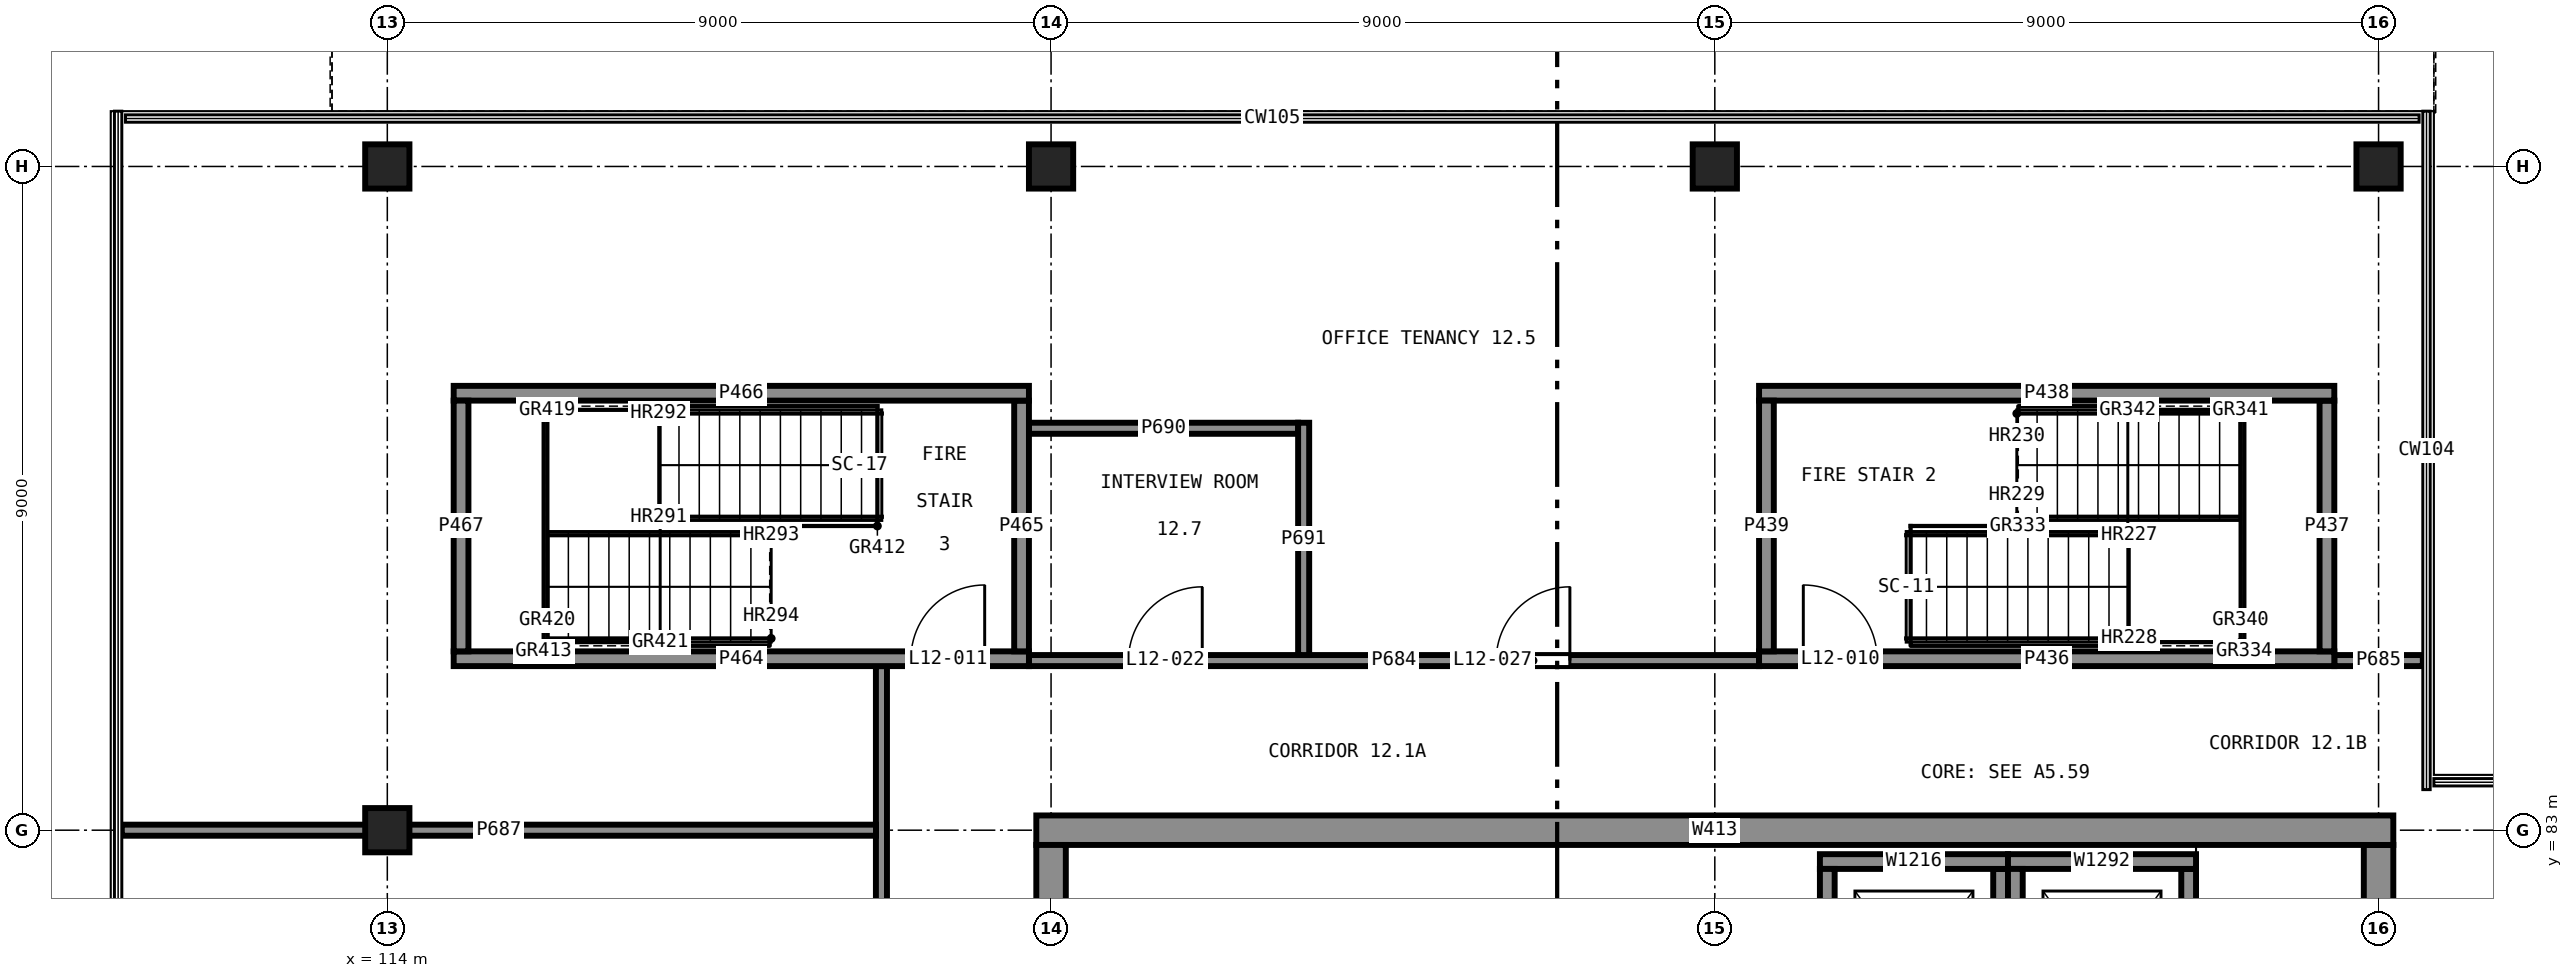
"""IFC4 building model, lengths in metres.
Left out: names, types, materials, properties, quantities, classifications, styles, units other than length and angle.
Written with IfcOpenShell. Run it as: python <this file> out.ifc"""

import sys

from ifc_helpers import new_model, si_unit, direction, frame, frame_2d, origin, origin_2d, place, context, subcontext, project, spatial, rectangle, extrude, element, fill, save


model = new_model("IFC4")
c1 = context("Model", 3, precision=1e-05, world=origin(), true_north=direction((0.0, 1.0)))
c2 = subcontext(c1, "Body", "Model", "MODEL_VIEW")
j1 = project(units=[si_unit("LENGTHUNIT", "METRE"), si_unit("PLANEANGLEUNIT", "RADIAN")], contexts=[c1])
p1 = place(None, origin())
s1 = spatial("IfcSite", under=j1, at=p1, CompositionType="ELEMENT")
p2 = place(p1, origin())
s2 = spatial("IfcBuilding", under=s1, at=p2, CompositionType="ELEMENT")
p3 = place(p2, frame((0.0, 0.0, 49.5)))
s3 = spatial("IfcBuildingStorey", under=s2, at=p3, CompositionType="ELEMENT", Elevation=49.5)
for number, where, z_axis, x_axis in (
    (1, (114.0, 83.0, 0.0), (0.0, 0.0, 1.0), (1.0, 0.0, 0.0)),
    (2, (114.0, 92.0, 0.0), (0.0, 0.0, 1.0), (1.0, 0.0, 0.0)),
    (3, (123.0, 92.0, 0.0), (0.0, 0.0, 1.0), (1.0, 0.0, 0.0)),
    (4, (132.0, 92.0, 0.0), (0.0, 0.0, 1.0), (1.0, 0.0, 0.0)),
    (5, (141.0, 92.0, 0.0), (0.0, 0.0, 1.0), (1.0, 0.0, 0.0)),
):
    element("IfcColumn", number, at=place(p3, frame(where, z_axis=z_axis, x_axis=x_axis)), inside=s3, PredefinedType="COLUMN", context=c2, shape_type="SweptSolid", body=[
        extrude(rectangle(XDim=0.6, YDim=0.6, at=origin_2d()), origin(), (0.0, 0.0, 1.0), 4.0),
    ])
p4 = place(p3, frame((141.0, 65.2, 0.0), z_axis=(0.0, 0.0, 1.0), x_axis=(0.0, 1.0, 0.0)))
e6 = element("IfcWall", 6, at=p4, inside=s3, PredefinedType="SHEAR", context=c2, shape_type="SweptSolid", body=[
    extrude(rectangle(XDim=17.6, YDim=0.4, at=frame_2d((8.8, 0.0))), origin(), (0.0, 0.0, 1.0), 4.0),
])
p5 = place(p4, frame((4.325, 0.0, 0.0)))
e7 = element("IfcOpeningElement", 7, at=p5, cuts=e6, PredefinedType="OPENING", context=c2, shape_type="SweptSolid", body=[
    extrude(rectangle(XDim=1.2, YDim=2.1, at=frame_2d((0.6, 1.05))), frame((0.0, 0.21, 0.0), z_axis=(0.0, -1.0, 0.0), x_axis=(1.0, 0.0, 0.0)), (0.0, 0.0, 1.0), 0.42),
])
p6 = place(p4, frame((12.075, 0.0, 0.0)))
e8 = element("IfcOpeningElement", 8, at=p6, cuts=e6, PredefinedType="OPENING", context=c2, shape_type="SweptSolid", body=[
    extrude(rectangle(XDim=1.2, YDim=2.1, at=frame_2d((0.6, 1.05))), frame((0.0, 0.21, 0.0), z_axis=(0.0, -1.0, 0.0), x_axis=(1.0, 0.0, 0.0)), (0.0, 0.0, 1.0), 0.42),
])
p7 = place(p3, frame((141.2, 83.0, 0.0), z_axis=(0.0, 0.0, 1.0), x_axis=(-1.0, 0.0, 0.0)))
e9 = element("IfcWall", 9, at=p7, inside=s3, PredefinedType="SHEAR", context=c2, shape_type="SweptSolid", body=[
    extrude(rectangle(XDim=18.4, YDim=0.4, at=frame_2d((9.2, 0.0))), origin(), (0.0, 0.0, 1.0), 4.0),
])
p8 = place(p3, frame((123.0, 82.8, 0.0), z_axis=(0.0, 0.0, 1.0), x_axis=(0.0, -1.0, 0.0)))
e10 = element("IfcWall", 10, at=p8, inside=s3, PredefinedType="SHEAR", context=c2, shape_type="SweptSolid", body=[
    extrude(rectangle(XDim=17.6, YDim=0.4, at=frame_2d((8.8, 0.0))), origin(), (0.0, 0.0, 1.0), 4.0),
])
p9 = place(p8, frame((12.075, 0.0, 0.0)))
e11 = element("IfcOpeningElement", 11, at=p9, cuts=e10, PredefinedType="OPENING", context=c2, shape_type="SweptSolid", body=[
    extrude(rectangle(XDim=1.2, YDim=2.1, at=frame_2d((0.6, 1.05))), frame((0.0, 0.21, 0.0), z_axis=(0.0, -1.0, 0.0), x_axis=(1.0, 0.0, 0.0)), (0.0, 0.0, 1.0), 0.42),
])
p10 = place(p8, frame((4.325, 0.0, 0.0)))
e12 = element("IfcOpeningElement", 12, at=p10, cuts=e10, PredefinedType="OPENING", context=c2, shape_type="SweptSolid", body=[
    extrude(rectangle(XDim=1.2, YDim=2.1, at=frame_2d((0.6, 1.05))), frame((0.0, 0.21, 0.0), z_axis=(0.0, -1.0, 0.0), x_axis=(1.0, 0.0, 0.0)), (0.0, 0.0, 1.0), 0.42),
])
p11 = place(p3, frame((135.875, 79.675, 0.0), z_axis=(0.0, 0.0, 1.0), x_axis=(0.0, 1.0, 0.0)))
e13 = element("IfcWall", 13, at=p11, inside=s3, PredefinedType="SHEAR", context=c2, shape_type="SweptSolid", body=[
    extrude(rectangle(XDim=2.8, YDim=0.2, at=frame_2d((1.4, 0.0))), origin(), (0.0, 0.0, 1.0), 4.0),
])
p12 = place(p3, frame((135.975, 82.575, 0.0), z_axis=(0.0, 0.0, 1.0), x_axis=(-1.0, 0.0, 0.0)))
e14 = element("IfcWall", 14, at=p12, inside=s3, PredefinedType="SHEAR", context=c2, shape_type="SweptSolid", body=[
    extrude(rectangle(XDim=2.55, YDim=0.2, at=frame_2d((1.275, 0.0))), origin(), (0.0, 0.0, 1.0), 4.0),
])
for number, where, z_axis, x_axis in (
    (15, (133.525, 82.475, 0.0), (0.0, 0.0, 1.0), (0.0, -1.0, 0.0)),
    (16, (138.425, 79.675, 0.0), (0.0, 0.0, 1.0), (0.0, 1.0, 0.0)),
):
    element("IfcWall", number, at=place(p3, frame(where, z_axis=z_axis, x_axis=x_axis)), inside=s3, PredefinedType="SHEAR", context=c2, shape_type="SweptSolid", body=[
        extrude(rectangle(XDim=2.8, YDim=0.2, at=frame_2d((1.4, 0.0))), origin(), (0.0, 0.0, 1.0), 4.0),
    ])
p13 = place(p3, frame((138.525, 82.575, 0.0), z_axis=(0.0, 0.0, 1.0), x_axis=(-1.0, 0.0, 0.0)))
e17 = element("IfcWall", 17, at=p13, inside=s3, PredefinedType="SHEAR", context=c2, shape_type="SweptSolid", body=[
    extrude(rectangle(XDim=2.55, YDim=0.2, at=frame_2d((1.275, 0.0))), origin(), (0.0, 0.0, 1.0), 4.0),
])
p14 = place(p3, frame((136.075, 82.475, 0.0), z_axis=(0.0, 0.0, 1.0), x_axis=(0.0, -1.0, 0.0)))
e18 = element("IfcWall", 18, at=p14, inside=s3, PredefinedType="SHEAR", context=c2, shape_type="SweptSolid", body=[
    extrude(rectangle(XDim=2.8, YDim=0.2, at=frame_2d((1.4, 0.0))), origin(), (0.0, 0.0, 1.0), 4.0),
])
p15 = place(p3, frame((132.6, 85.325, 0.0), z_axis=(0.0, 0.0, 1.0), x_axis=(1.0, 0.0, 0.0)))
e19 = element("IfcWall", 19, at=p15, inside=s3, PredefinedType="SHEAR", context=c2, shape_type="SweptSolid", body=[
    extrude(rectangle(XDim=7.8, YDim=0.2, at=frame_2d((3.9, 0.0))), origin(), (0.0, 0.0, 1.0), 3.58),
])
p16 = place(p15, frame((0.6, 0.0, 0.0)))
e20 = element("IfcOpeningElement", 20, at=p16, cuts=e19, PredefinedType="OPENING", context=c2, shape_type="SweptSolid", body=[
    extrude(rectangle(XDim=1.0, YDim=2.1, at=frame_2d((0.5, 1.05))), frame((0.0, 0.11, 0.0), z_axis=(0.0, -1.0, 0.0), x_axis=(1.0, 0.0, 0.0)), (0.0, 0.0, 1.0), 0.22),
])
p17 = place(p3, frame((140.3, 85.425, 0.0), z_axis=(0.0, 0.0, 1.0), x_axis=(0.0, 1.0, 0.0)))
e21 = element("IfcWall", 21, at=p17, inside=s3, PredefinedType="SHEAR", context=c2, shape_type="SweptSolid", body=[
    extrude(rectangle(XDim=3.4, YDim=0.2, at=frame_2d((1.7, 0.0))), origin(), (0.0, 0.0, 1.0), 3.58),
])
p18 = place(p3, frame((140.4, 88.925, 0.0), z_axis=(0.0, 0.0, 1.0), x_axis=(-1.0, 0.0, 0.0)))
e22 = element("IfcWall", 22, at=p18, inside=s3, PredefinedType="SHEAR", context=c2, shape_type="SweptSolid", body=[
    extrude(rectangle(XDim=7.8, YDim=0.2, at=frame_2d((3.9, 0.0))), origin(), (0.0, 0.0, 1.0), 3.58),
])
p19 = place(p3, frame((132.7, 88.825, 0.0), z_axis=(0.0, 0.0, 1.0), x_axis=(0.0, -1.0, 0.0)))
e23 = element("IfcWall", 23, at=p19, inside=s3, PredefinedType="SHEAR", context=c2, shape_type="SweptSolid", body=[
    extrude(rectangle(XDim=3.4, YDim=0.2, at=frame_2d((1.7, 0.0))), origin(), (0.0, 0.0, 1.0), 3.58),
])
p20 = place(p3, frame((114.9, 85.325, 0.0), z_axis=(0.0, 0.0, 1.0), x_axis=(1.0, 0.0, 0.0)))
e24 = element("IfcWall", 24, at=p20, inside=s3, PredefinedType="SHEAR", context=c2, shape_type="SweptSolid", body=[
    extrude(rectangle(XDim=7.8, YDim=0.2, at=frame_2d((3.9, 0.0))), origin(), (0.0, 0.0, 1.0), 3.58),
])
p21 = place(p20, frame((6.2, 0.0, 0.0)))
e25 = element("IfcOpeningElement", 25, at=p21, cuts=e24, PredefinedType="OPENING", context=c2, shape_type="SweptSolid", body=[
    extrude(rectangle(XDim=1.0, YDim=2.1, at=frame_2d((0.5, 1.05))), frame((0.0, 0.11, 0.0), z_axis=(0.0, -1.0, 0.0), x_axis=(1.0, 0.0, 0.0)), (0.0, 0.0, 1.0), 0.22),
])
p22 = place(p3, frame((122.6, 85.425, 0.0), z_axis=(0.0, 0.0, 1.0), x_axis=(0.0, 1.0, 0.0)))
e26 = element("IfcWall", 26, at=p22, inside=s3, PredefinedType="SHEAR", context=c2, shape_type="SweptSolid", body=[
    extrude(rectangle(XDim=3.4, YDim=0.2, at=frame_2d((1.7, 0.0))), origin(), (0.0, 0.0, 1.0), 3.58),
])
p23 = place(p3, frame((122.7, 88.925, 0.0), z_axis=(0.0, 0.0, 1.0), x_axis=(-1.0, 0.0, 0.0)))
e27 = element("IfcWall", 27, at=p23, inside=s3, PredefinedType="SHEAR", context=c2, shape_type="SweptSolid", body=[
    extrude(rectangle(XDim=7.8, YDim=0.2, at=frame_2d((3.9, 0.0))), origin(), (0.0, 0.0, 1.0), 3.58),
])
p24 = place(p3, frame((115.0, 88.825, 0.0), z_axis=(0.0, 0.0, 1.0), x_axis=(0.0, -1.0, 0.0)))
e28 = element("IfcWall", 28, at=p24, inside=s3, PredefinedType="SHEAR", context=c2, shape_type="SweptSolid", body=[
    extrude(rectangle(XDim=3.4, YDim=0.2, at=frame_2d((1.7, 0.0))), origin(), (0.0, 0.0, 1.0), 3.58),
])
p25 = place(p3, frame((120.7, 64.4, 0.0), z_axis=(0.0, 0.0, 1.0), x_axis=(0.0, 1.0, 0.0)))
e29 = element("IfcWall", 29, at=p25, inside=s3, PredefinedType="PARTITIONING", context=c2, shape_type="SweptSolid", body=[
    extrude(rectangle(XDim=20.825, YDim=0.15, at=frame_2d((10.413, 0.0))), origin(), (0.0, 0.0, 1.0), 3.58),
])
p26 = place(p25, frame((4.413, 0.0, 0.0)))
e30 = element("IfcOpeningElement", 30, at=p26, cuts=e29, PredefinedType="OPENING", context=c2, shape_type="SweptSolid", body=[
    extrude(rectangle(XDim=1.0, YDim=2.1, at=frame_2d((0.5, 1.05))), frame((0.0, 0.085, 0.0), z_axis=(0.0, -1.0, 0.0), x_axis=(1.0, 0.0, 0.0)), (0.0, 0.0, 1.0), 0.17),
])
p27 = place(p25, frame((13.6, 0.0, 0.0)))
e31 = element("IfcOpeningElement", 31, at=p27, cuts=e29, PredefinedType="OPENING", context=c2, shape_type="SweptSolid", body=[
    extrude(rectangle(XDim=1.0, YDim=2.1, at=frame_2d((0.5, 1.05))), frame((0.0, 0.085, 0.0), z_axis=(0.0, -1.0, 0.0), x_axis=(1.0, 0.0, 0.0)), (0.0, 0.0, 1.0), 0.17),
])
p28 = place(p3, frame((122.7, 85.3, 0.0), z_axis=(0.0, 0.0, 1.0), x_axis=(1.0, 0.0, 0.0)))
e32 = element("IfcWall", 32, at=p28, inside=s3, PredefinedType="PARTITIONING", context=c2, shape_type="SweptSolid", body=[
    extrude(rectangle(XDim=9.9, YDim=0.15, at=frame_2d((4.95, 0.0))), origin(), (0.0, 0.0, 1.0), 3.58),
])
p29 = place(p28, frame((1.35, 0.0, 0.0)))
e33 = element("IfcOpeningElement", 33, at=p29, cuts=e32, PredefinedType="OPENING", context=c2, shape_type="SweptSolid", body=[
    extrude(rectangle(XDim=1.0, YDim=2.1, at=frame_2d((0.5, 1.05))), frame((0.0, 0.085, 0.0), z_axis=(0.0, -1.0, 0.0), x_axis=(1.0, 0.0, 0.0)), (0.0, 0.0, 1.0), 0.17),
])
p30 = place(p28, frame((6.335, 0.0, 0.0)))
e34 = element("IfcOpeningElement", 34, at=p30, cuts=e32, PredefinedType="OPENING", context=c2, shape_type="SweptSolid", body=[
    extrude(rectangle(XDim=1.0, YDim=2.1, at=frame_2d((0.5, 1.05))), frame((0.0, 0.085, 0.0), z_axis=(0.0, -1.0, 0.0), x_axis=(1.0, 0.0, 0.0)), (0.0, 0.0, 1.0), 0.17),
])
p31 = place(p3, frame((140.4, 85.3, 0.0), z_axis=(0.0, 0.0, 1.0), x_axis=(1.0, 0.0, 0.0)))
e35 = element("IfcWall", 35, at=p31, inside=s3, PredefinedType="PARTITIONING", context=c2, shape_type="SweptSolid", body=[
    extrude(rectangle(XDim=1.2, YDim=0.15, at=frame_2d((0.6, 0.0))), origin(), (0.0, 0.0, 1.0), 3.58),
])
p32 = place(p3, frame((110.4, 83.0, 0.0), z_axis=(0.0, 0.0, 1.0), x_axis=(1.0, 0.0, 0.0)))
e36 = element("IfcWall", 36, at=p32, inside=s3, PredefinedType="PARTITIONING", context=c2, shape_type="SweptSolid", body=[
    extrude(rectangle(XDim=10.226, YDim=0.15, at=frame_2d((5.113, 0.0))), origin(), (0.0, 0.0, 1.0), 2.68),
])
p33 = place(p3, frame((122.7, 88.45, 0.0), z_axis=(0.0, 0.0, 1.0), x_axis=(1.0, 0.0, 0.0)))
e37 = element("IfcWall", 37, at=p33, inside=s3, PredefinedType="PARTITIONING", context=c2, shape_type="SweptSolid", body=[
    extrude(rectangle(XDim=3.65, YDim=0.15, at=frame_2d((1.825, 0.0))), origin(), (0.0, 0.0, 1.0), 3.58),
])
p34 = place(p3, frame((126.425, 85.375, 0.0), z_axis=(0.0, 0.0, 1.0), x_axis=(0.0, 1.0, 0.0)))
e38 = element("IfcWall", 38, at=p34, inside=s3, PredefinedType="PARTITIONING", context=c2, shape_type="SweptSolid", body=[
    extrude(rectangle(XDim=3.15, YDim=0.15, at=frame_2d((1.575, 0.0))), origin(), (0.0, 0.0, 1.0), 3.58),
])
p35 = place(p16, origin())
e39 = element("IfcDoor", 39, at=p35, inside=s3, OperationType="SINGLE_SWING_RIGHT", PredefinedType="DOOR", context=c2, shape_type="SweptSolid", body=[
    extrude(rectangle(XDim=1.0, YDim=2.1, at=frame_2d((0.5, 1.05))), frame((0.0, 0.025, 0.0), z_axis=(0.0, -1.0, 0.0), x_axis=(1.0, 0.0, 0.0)), (0.0, 0.0, 1.0), 0.05),
])
fill(e20, e39)
p36 = place(p21, origin())
e40 = element("IfcDoor", 40, at=p36, inside=s3, OperationType="SINGLE_SWING_LEFT", PredefinedType="DOOR", context=c2, shape_type="SweptSolid", body=[
    extrude(rectangle(XDim=1.0, YDim=2.1, at=frame_2d((0.5, 1.05))), frame((0.0, 0.025, 0.0), z_axis=(0.0, -1.0, 0.0), x_axis=(1.0, 0.0, 0.0)), (0.0, 0.0, 1.0), 0.05),
])
fill(e25, e40)
p37 = place(p29, origin())
e41 = element("IfcDoor", 41, at=p37, inside=s3, OperationType="SINGLE_SWING_LEFT", PredefinedType="DOOR", context=c2, shape_type="SweptSolid", body=[
    extrude(rectangle(XDim=1.0, YDim=2.1, at=frame_2d((0.5, 1.05))), frame((0.0, 0.025, 0.0), z_axis=(0.0, -1.0, 0.0), x_axis=(1.0, 0.0, 0.0)), (0.0, 0.0, 1.0), 0.05),
])
fill(e33, e41)
p38 = place(p30, origin())
e42 = element("IfcDoor", 42, at=p38, inside=s3, OperationType="SINGLE_SWING_LEFT", PredefinedType="DOOR", context=c2, shape_type="SweptSolid", body=[
    extrude(rectangle(XDim=1.0, YDim=2.1, at=frame_2d((0.5, 1.05))), frame((0.0, 0.025, 0.0), z_axis=(0.0, -1.0, 0.0), x_axis=(1.0, 0.0, 0.0)), (0.0, 0.0, 1.0), 0.05),
])
fill(e34, e42)
save(model, sys.argv[1])
